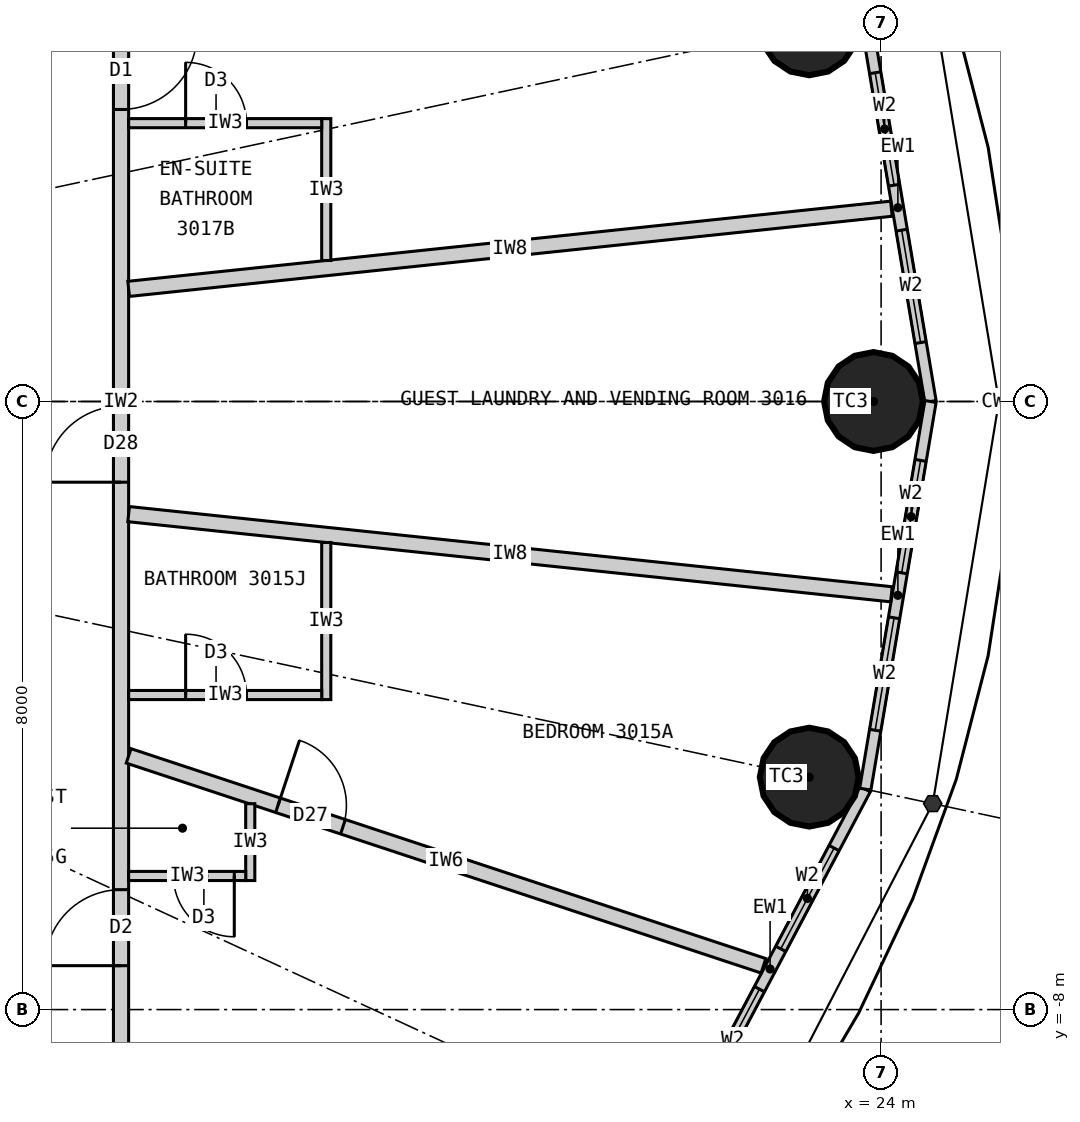
"""IFC4 building model, lengths in metres.
Left out: names, types, materials, properties, quantities, classifications, styles, units other than length and angle.
Written with IfcOpenShell. Run it as: python <this file> out.ifc"""

import sys

from ifc_helpers import new_model, si_unit, direction, frame, frame_2d, origin, origin_2d, place, context, subcontext, project, spatial, rectangle, circle, extrude, element, fill, save


model = new_model("IFC4")
c1 = context("Model", 3, precision=1e-05, world=origin(), true_north=direction((0.0, 1.0)))
c2 = subcontext(c1, "Body", "Model", "MODEL_VIEW")
j1 = project(units=[si_unit("LENGTHUNIT", "METRE"), si_unit("PLANEANGLEUNIT", "RADIAN")], contexts=[c1])
p1 = place(None, origin())
s1 = spatial("IfcSite", under=j1, at=p1, CompositionType="ELEMENT")
p2 = place(p1, origin())
s2 = spatial("IfcBuilding", under=s1, at=p2, CompositionType="ELEMENT")
p3 = place(p2, frame((0.0, 0.0, 118.8)))
s3 = spatial("IfcBuildingStorey", under=s2, at=p3, CompositionType="ELEMENT", Elevation=118.8)
for number, where, z_axis, x_axis in (
    (1, (23.9, 0.0, 0.0), (0.0, 0.0, 1.0), (1.0, 0.0, 0.0)),
    (2, (23.055, 4.942, 0.0), (0.0, 0.0, 1.0), (1.0, 0.0, 0.0)),
    (3, (23.055, -4.942, 0.0), (0.0, 0.0, 1.0), (1.0, 0.0, 0.0)),
):
    element("IfcColumn", number, at=place(p3, frame(where, z_axis=z_axis, x_axis=x_axis)), inside=s3, PredefinedType="COLUMN", context=c2, shape_type="SweptSolid", body=[
        extrude(circle(Radius=0.65, at=origin_2d()), origin(), (0.0, 0.0, 1.0), 3.3),
    ])
p4 = place(p3, frame((24.65, 0.0, 0.0), z_axis=(0.0, 0.0, 1.0), x_axis=(-0.165883894218, 0.986145290329, 0.0)))
e4 = element("IfcWall", 4, at=p4, inside=s3, PredefinedType="ELEMENTEDWALL", context=c2, shape_type="SweptSolid", body=[
    extrude(rectangle(XDim=5.172, YDim=0.15, at=frame_2d((2.586, 0.0))), origin(), (0.0, 0.0, 1.0), 3.12),
])
p5 = place(p4, frame((0.786, 0.0, 0.9)))
e5 = element("IfcOpeningElement", 5, at=p5, cuts=e4, PredefinedType="OPENING", context=c2, shape_type="SweptSolid", body=[
    extrude(rectangle(XDim=1.5, YDim=1.9, at=frame_2d((0.75, 0.95))), frame((0.0, 0.085, 0.0), z_axis=(0.0, -1.0, 0.0), x_axis=(1.0, 0.0, 0.0)), (0.0, 0.0, 1.0), 0.17),
])
p6 = place(p4, frame((2.886, 0.0, 0.9)))
e6 = element("IfcOpeningElement", 6, at=p6, cuts=e4, PredefinedType="OPENING", context=c2, shape_type="SweptSolid", body=[
    extrude(rectangle(XDim=1.5, YDim=1.9, at=frame_2d((0.75, 0.95))), frame((0.0, 0.085, 0.0), z_axis=(0.0, -1.0, 0.0), x_axis=(1.0, 0.0, 0.0)), (0.0, 0.0, 1.0), 0.17),
])
p7 = place(p3, frame((21.287, -9.832, 0.0), z_axis=(0.0, 0.0, 1.0), x_axis=(0.467814388454, 0.883826735257, 0.0)))
e7 = element("IfcWall", 7, at=p7, inside=s3, PredefinedType="ELEMENTEDWALL", context=c2, shape_type="SweptSolid", body=[
    extrude(rectangle(XDim=5.354, YDim=0.15, at=frame_2d((2.677, 0.0))), origin(), (0.0, 0.0, 1.0), 3.12),
])
p8 = place(p7, frame((0.877, 0.0, 0.9)))
e8 = element("IfcOpeningElement", 8, at=p8, cuts=e7, PredefinedType="OPENING", context=c2, shape_type="SweptSolid", body=[
    extrude(rectangle(XDim=1.5, YDim=1.9, at=frame_2d((0.75, 0.95))), frame((0.0, 0.085, 0.0), z_axis=(0.0, -1.0, 0.0), x_axis=(1.0, 0.0, 0.0)), (0.0, 0.0, 1.0), 0.17),
])
p9 = place(p7, frame((2.977, 0.0, 0.9)))
e9 = element("IfcOpeningElement", 9, at=p9, cuts=e7, PredefinedType="OPENING", context=c2, shape_type="SweptSolid", body=[
    extrude(rectangle(XDim=1.5, YDim=1.9, at=frame_2d((0.75, 0.95))), frame((0.0, 0.085, 0.0), z_axis=(0.0, -1.0, 0.0), x_axis=(1.0, 0.0, 0.0)), (0.0, 0.0, 1.0), 0.17),
])
p10 = place(p3, frame((23.792, -5.1, 0.0), z_axis=(0.0, 0.0, 1.0), x_axis=(0.165883894218, 0.986145290329, 0.0)))
e10 = element("IfcWall", 10, at=p10, inside=s3, PredefinedType="ELEMENTEDWALL", context=c2, shape_type="SweptSolid", body=[
    extrude(rectangle(XDim=5.172, YDim=0.15, at=frame_2d((2.586, 0.0))), origin(), (0.0, 0.0, 1.0), 3.12),
])
p11 = place(p10, frame((0.786, 0.0, 0.9)))
e11 = element("IfcOpeningElement", 11, at=p11, cuts=e10, PredefinedType="OPENING", context=c2, shape_type="SweptSolid", body=[
    extrude(rectangle(XDim=1.5, YDim=1.9, at=frame_2d((0.75, 0.95))), frame((0.0, 0.085, 0.0), z_axis=(0.0, -1.0, 0.0), x_axis=(1.0, 0.0, 0.0)), (0.0, 0.0, 1.0), 0.17),
])
p12 = place(p10, frame((2.886, 0.0, 0.9)))
e12 = element("IfcOpeningElement", 12, at=p12, cuts=e10, PredefinedType="OPENING", context=c2, shape_type="SweptSolid", body=[
    extrude(rectangle(XDim=1.5, YDim=1.9, at=frame_2d((0.75, 0.95))), frame((0.0, 0.085, 0.0), z_axis=(0.0, -1.0, 0.0), x_axis=(1.0, 0.0, 0.0)), (0.0, 0.0, 1.0), 0.17),
])
p13 = place(p3, frame((14.0, -9.9, 0.0), z_axis=(0.0, 0.0, 1.0), x_axis=(0.0, 1.0, 0.0)))
e13 = element("IfcWall", 13, at=p13, inside=s3, PredefinedType="PARTITIONING", context=c2, shape_type="SweptSolid", body=[
    extrude(rectangle(XDim=19.8, YDim=0.2, at=frame_2d((9.9, 0.0))), origin(), (0.0, 0.0, 1.0), 3.12),
])
p14 = place(p13, frame((2.478, 0.0, 0.0)))
e14 = element("IfcOpeningElement", 14, at=p14, cuts=e13, PredefinedType="OPENING", context=c2, shape_type="SweptSolid", body=[
    extrude(rectangle(XDim=1.0, YDim=2.2, at=frame_2d((0.5, 1.1))), frame((0.0, 0.11, 0.0), z_axis=(0.0, -1.0, 0.0), x_axis=(1.0, 0.0, 0.0)), (0.0, 0.0, 1.0), 0.22),
])
p15 = place(p13, frame((8.838, 0.0, 0.0)))
e15 = element("IfcOpeningElement", 15, at=p15, cuts=e13, PredefinedType="OPENING", context=c2, shape_type="SweptSolid", body=[
    extrude(rectangle(XDim=1.0, YDim=2.2, at=frame_2d((0.5, 1.1))), frame((0.0, 0.11, 0.0), z_axis=(0.0, -1.0, 0.0), x_axis=(1.0, 0.0, 0.0)), (0.0, 0.0, 1.0), 0.22),
])
p16 = place(p13, frame((13.742, 0.0, 0.0)))
e16 = element("IfcOpeningElement", 16, at=p16, cuts=e13, PredefinedType="OPENING", context=c2, shape_type="SweptSolid", body=[
    extrude(rectangle(XDim=1.0, YDim=2.2, at=frame_2d((0.5, 1.1))), frame((0.0, 0.11, 0.0), z_axis=(0.0, -1.0, 0.0), x_axis=(1.0, 0.0, 0.0)), (0.0, 0.0, 1.0), 0.22),
])
p17 = place(p13, frame((18.698, 0.0, 0.0)))
e17 = element("IfcOpeningElement", 17, at=p17, cuts=e13, PredefinedType="OPENING", context=c2, shape_type="SweptSolid", body=[
    extrude(rectangle(XDim=1.0, YDim=2.2, at=frame_2d((0.5, 1.1))), frame((0.0, 0.11, 0.0), z_axis=(0.0, -1.0, 0.0), x_axis=(1.0, 0.0, 0.0)), (0.0, 0.0, 1.0), 0.22),
])
p18 = place(p3, frame((14.1, 1.482, 0.0), z_axis=(0.0, 0.0, 1.0), x_axis=(0.994523202615, 0.104516024894, 0.0)))
e18 = element("IfcWall", 18, at=p18, inside=s3, PredefinedType="PARTITIONING", context=c2, shape_type="SweptSolid", body=[
    extrude(rectangle(XDim=10.091, YDim=0.2, at=frame_2d((5.045, 0.0))), origin(), (0.0, 0.0, 1.0), 2.47),
])
p19 = place(p3, frame((14.1, -4.662, 0.0), z_axis=(0.0, 0.0, 1.0), x_axis=(0.949446466373, -0.313928984789, 0.0)))
e19 = element("IfcWall", 19, at=p19, inside=s3, PredefinedType="PARTITIONING", context=c2, shape_type="SweptSolid", body=[
    extrude(rectangle(XDim=8.797, YDim=0.2, at=frame_2d((4.399, 0.0))), origin(), (0.0, 0.0, 1.0), 3.12),
])
p20 = place(p19, frame((2.07, 0.0, 0.0)))
e20 = element("IfcOpeningElement", 20, at=p20, cuts=e19, PredefinedType="OPENING", context=c2, shape_type="SweptSolid", body=[
    extrude(rectangle(XDim=0.9, YDim=2.1, at=frame_2d((0.45, 1.05))), frame((0.0, 0.11, 0.0), z_axis=(0.0, -1.0, 0.0), x_axis=(1.0, 0.0, 0.0)), (0.0, 0.0, 1.0), 0.22),
])
p21 = place(p3, frame((14.1, -1.482, 0.0), z_axis=(0.0, 0.0, 1.0), x_axis=(0.994523202615, -0.104516024894, 0.0)))
e21 = element("IfcWall", 21, at=p21, inside=s3, PredefinedType="PARTITIONING", context=c2, shape_type="SweptSolid", body=[
    extrude(rectangle(XDim=10.091, YDim=0.2, at=frame_2d((5.045, 0.0))), origin(), (0.0, 0.0, 1.0), 2.47),
])
p22 = place(p3, frame((15.7, -5.291, 0.0), z_axis=(0.0, 0.0, 1.0), x_axis=(0.0, -1.0, 0.0)))
e22 = element("IfcWall", 22, at=p22, inside=s3, PredefinedType="PARTITIONING", context=c2, shape_type="SweptSolid", body=[
    extrude(rectangle(XDim=1.011, YDim=0.12, at=frame_2d((0.505, 0.0))), origin(), (0.0, 0.0, 1.0), 3.12),
])
p23 = place(p3, frame((14.1, -6.242, 0.0), z_axis=(0.0, 0.0, 1.0), x_axis=(1.0, 0.0, 0.0)))
e23 = element("IfcWall", 23, at=p23, inside=s3, PredefinedType="PARTITIONING", context=c2, shape_type="SweptSolid", body=[
    extrude(rectangle(XDim=1.54, YDim=0.12, at=frame_2d((0.77, 0.0))), origin(), (0.0, 0.0, 1.0), 3.12),
])
p24 = place(p23, frame((0.59, 0.0, 0.0)))
e24 = element("IfcOpeningElement", 24, at=p24, cuts=e23, PredefinedType="OPENING", context=c2, shape_type="SweptSolid", body=[
    extrude(rectangle(XDim=0.8, YDim=2.1, at=frame_2d((0.4, 1.05))), frame((0.0, 0.07, 0.0), z_axis=(0.0, -1.0, 0.0), x_axis=(1.0, 0.0, 0.0)), (0.0, 0.0, 1.0), 0.14),
])
p25 = place(p3, frame((16.7, -1.855, 0.0), z_axis=(0.0, 0.0, 1.0), x_axis=(0.0, -1.0, 0.0)))
e25 = element("IfcWall", 25, at=p25, inside=s3, PredefinedType="PARTITIONING", context=c2, shape_type="SweptSolid", body=[
    extrude(rectangle(XDim=2.067, YDim=0.12, at=frame_2d((1.033, 0.0))), origin(), (0.0, 0.0, 1.0), 3.12),
])
p26 = place(p3, frame((14.1, -3.862, 0.0), z_axis=(0.0, 0.0, 1.0), x_axis=(1.0, 0.0, 0.0)))
e26 = element("IfcWall", 26, at=p26, inside=s3, PredefinedType="PARTITIONING", context=c2, shape_type="SweptSolid", body=[
    extrude(rectangle(XDim=2.54, YDim=0.12, at=frame_2d((1.27, 0.0))), origin(), (0.0, 0.0, 1.0), 2.37),
])
p27 = place(p26, frame((0.75, 0.0, 0.0)))
e27 = element("IfcOpeningElement", 27, at=p27, cuts=e26, PredefinedType="OPENING", context=c2, shape_type="SweptSolid", body=[
    extrude(rectangle(XDim=0.8, YDim=2.1, at=frame_2d((0.4, 1.05))), frame((0.0, 0.07, 0.0), z_axis=(0.0, -1.0, 0.0), x_axis=(1.0, 0.0, 0.0)), (0.0, 0.0, 1.0), 0.14),
])
p28 = place(p3, frame((16.7, 1.855, 0.0), z_axis=(0.0, 0.0, 1.0), x_axis=(0.0, 1.0, 0.0)))
e28 = element("IfcWall", 28, at=p28, inside=s3, PredefinedType="PARTITIONING", context=c2, shape_type="SweptSolid", body=[
    extrude(rectangle(XDim=1.867, YDim=0.12, at=frame_2d((0.933, 0.0))), origin(), (0.0, 0.0, 1.0), 3.12),
])
p29 = place(p3, frame((14.1, 3.662, 0.0), z_axis=(0.0, 0.0, 1.0), x_axis=(1.0, 0.0, 0.0)))
e29 = element("IfcWall", 29, at=p29, inside=s3, PredefinedType="PARTITIONING", context=c2, shape_type="SweptSolid", body=[
    extrude(rectangle(XDim=2.54, YDim=0.12, at=frame_2d((1.27, 0.0))), origin(), (0.0, 0.0, 1.0), 2.37),
])
p30 = place(p29, frame((0.75, 0.0, 0.0)))
e30 = element("IfcOpeningElement", 30, at=p30, cuts=e29, PredefinedType="OPENING", context=c2, shape_type="SweptSolid", body=[
    extrude(rectangle(XDim=0.8, YDim=2.1, at=frame_2d((0.4, 1.05))), frame((0.0, 0.07, 0.0), z_axis=(0.0, -1.0, 0.0), x_axis=(1.0, 0.0, 0.0)), (0.0, 0.0, 1.0), 0.14),
])
p31 = place(p5, origin())
e31 = element("IfcWindow", 31, at=p31, inside=s3, PartitioningType="SINGLE_PANEL", PredefinedType="WINDOW", context=c2, shape_type="SweptSolid", body=[
    extrude(rectangle(XDim=1.5, YDim=1.9, at=frame_2d((0.75, 0.95))), frame((0.0, 0.03, 0.0), z_axis=(0.0, -1.0, 0.0), x_axis=(1.0, 0.0, 0.0)), (0.0, 0.0, 1.0), 0.06),
])
fill(e5, e31)
p32 = place(p6, origin())
e32 = element("IfcWindow", 32, at=p32, inside=s3, PartitioningType="SINGLE_PANEL", PredefinedType="WINDOW", context=c2, shape_type="SweptSolid", body=[
    extrude(rectangle(XDim=1.5, YDim=1.9, at=frame_2d((0.75, 0.95))), frame((0.0, 0.03, 0.0), z_axis=(0.0, -1.0, 0.0), x_axis=(1.0, 0.0, 0.0)), (0.0, 0.0, 1.0), 0.06),
])
fill(e6, e32)
p33 = place(p8, origin())
e33 = element("IfcWindow", 33, at=p33, inside=s3, PartitioningType="SINGLE_PANEL", PredefinedType="WINDOW", context=c2, shape_type="SweptSolid", body=[
    extrude(rectangle(XDim=1.5, YDim=1.9, at=frame_2d((0.75, 0.95))), frame((0.0, 0.03, 0.0), z_axis=(0.0, -1.0, 0.0), x_axis=(1.0, 0.0, 0.0)), (0.0, 0.0, 1.0), 0.06),
])
fill(e8, e33)
p34 = place(p9, origin())
e34 = element("IfcWindow", 34, at=p34, inside=s3, PartitioningType="SINGLE_PANEL", PredefinedType="WINDOW", context=c2, shape_type="SweptSolid", body=[
    extrude(rectangle(XDim=1.5, YDim=1.9, at=frame_2d((0.75, 0.95))), frame((0.0, 0.03, 0.0), z_axis=(0.0, -1.0, 0.0), x_axis=(1.0, 0.0, 0.0)), (0.0, 0.0, 1.0), 0.06),
])
fill(e9, e34)
p35 = place(p11, origin())
e35 = element("IfcWindow", 35, at=p35, inside=s3, PartitioningType="SINGLE_PANEL", PredefinedType="WINDOW", context=c2, shape_type="SweptSolid", body=[
    extrude(rectangle(XDim=1.5, YDim=1.9, at=frame_2d((0.75, 0.95))), frame((0.0, 0.03, 0.0), z_axis=(0.0, -1.0, 0.0), x_axis=(1.0, 0.0, 0.0)), (0.0, 0.0, 1.0), 0.06),
])
fill(e11, e35)
p36 = place(p12, origin())
e36 = element("IfcWindow", 36, at=p36, inside=s3, PartitioningType="SINGLE_PANEL", PredefinedType="WINDOW", context=c2, shape_type="SweptSolid", body=[
    extrude(rectangle(XDim=1.5, YDim=1.9, at=frame_2d((0.75, 0.95))), frame((0.0, 0.03, 0.0), z_axis=(0.0, -1.0, 0.0), x_axis=(1.0, 0.0, 0.0)), (0.0, 0.0, 1.0), 0.06),
])
fill(e12, e36)
p37 = place(p24, origin())
e37 = element("IfcDoor", 37, at=p37, inside=s3, OperationType="SINGLE_SWING_RIGHT", PredefinedType="DOOR", context=c2, shape_type="SweptSolid", body=[
    extrude(rectangle(XDim=0.8, YDim=2.1, at=frame_2d((0.4, 1.05))), frame((0.0, 0.025, 0.0), z_axis=(0.0, -1.0, 0.0), x_axis=(1.0, 0.0, 0.0)), (0.0, 0.0, 1.0), 0.05),
])
fill(e24, e37)
p38 = place(p14, origin())
e38 = element("IfcDoor", 38, at=p38, inside=s3, OperationType="SINGLE_SWING_LEFT", PredefinedType="DOOR", context=c2, shape_type="SweptSolid", body=[
    extrude(rectangle(XDim=1.0, YDim=2.2, at=frame_2d((0.5, 1.1))), frame((0.0, 0.025, 0.0), z_axis=(0.0, -1.0, 0.0), x_axis=(1.0, 0.0, 0.0)), (0.0, 0.0, 1.0), 0.05),
])
fill(e14, e38)
p39 = place(p27, origin())
e39 = element("IfcDoor", 39, at=p39, inside=s3, OperationType="SINGLE_SWING_LEFT", PredefinedType="DOOR", context=c2, shape_type="SweptSolid", body=[
    extrude(rectangle(XDim=0.8, YDim=2.1, at=frame_2d((0.4, 1.05))), frame((0.0, 0.025, 0.0), z_axis=(0.0, -1.0, 0.0), x_axis=(1.0, 0.0, 0.0)), (0.0, 0.0, 1.0), 0.05),
])
fill(e27, e39)
p40 = place(p20, origin())
e40 = element("IfcDoor", 40, at=p40, inside=s3, OperationType="SINGLE_SWING_LEFT", PredefinedType="DOOR", context=c2, shape_type="SweptSolid", body=[
    extrude(rectangle(XDim=0.9, YDim=2.1, at=frame_2d((0.45, 1.05))), frame((0.0, 0.025, 0.0), z_axis=(0.0, -1.0, 0.0), x_axis=(1.0, 0.0, 0.0)), (0.0, 0.0, 1.0), 0.05),
])
fill(e20, e40)
p41 = place(p15, origin())
e41 = element("IfcDoor", 41, at=p41, inside=s3, OperationType="SINGLE_SWING_LEFT", PredefinedType="DOOR", context=c2, shape_type="SweptSolid", body=[
    extrude(rectangle(XDim=1.0, YDim=2.2, at=frame_2d((0.5, 1.1))), frame((0.0, 0.025, 0.0), z_axis=(0.0, -1.0, 0.0), x_axis=(1.0, 0.0, 0.0)), (0.0, 0.0, 1.0), 0.05),
])
fill(e15, e41)
p42 = place(p30, origin())
e42 = element("IfcDoor", 42, at=p42, inside=s3, OperationType="SINGLE_SWING_LEFT", PredefinedType="DOOR", context=c2, shape_type="SweptSolid", body=[
    extrude(rectangle(XDim=0.8, YDim=2.1, at=frame_2d((0.4, 1.05))), frame((0.0, 0.025, 0.0), z_axis=(0.0, -1.0, 0.0), x_axis=(1.0, 0.0, 0.0)), (0.0, 0.0, 1.0), 0.05),
])
fill(e30, e42)
p43 = place(p16, origin())
e43 = element("IfcDoor", 43, at=p43, inside=s3, OperationType="SINGLE_SWING_RIGHT", PredefinedType="DOOR", context=c2, shape_type="SweptSolid", body=[
    extrude(rectangle(XDim=1.0, YDim=2.2, at=frame_2d((0.5, 1.1))), frame((0.0, 0.025, 0.0), z_axis=(0.0, -1.0, 0.0), x_axis=(1.0, 0.0, 0.0)), (0.0, 0.0, 1.0), 0.05),
])
fill(e16, e43)
save(model, sys.argv[1])
